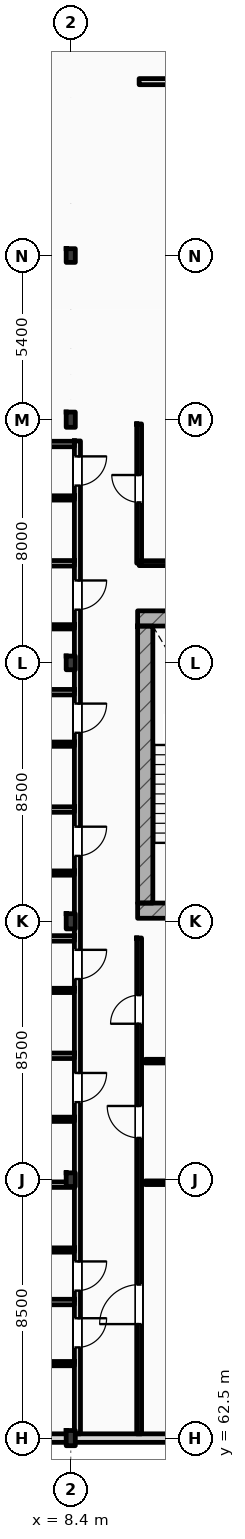
"""IFC4 building model, lengths in metres.
Left out: names, types, materials, properties, quantities, classifications, styles, units other than length and angle.
Written with IfcOpenShell. Run it as: python <this file> out.ifc"""

import sys

from ifc_helpers import new_model, si_unit, direction, frame, frame_2d, origin, origin_2d, place, context, subcontext, project, spatial, rectangle, i_section, extrude, element, fill, save


model = new_model("IFC4")
c1 = context("Model", 3, precision=1e-05, world=origin(), true_north=direction((0.0, 1.0)))
c2 = subcontext(c1, "Body", "Model", "MODEL_VIEW")
j1 = project(units=[si_unit("LENGTHUNIT", "METRE"), si_unit("PLANEANGLEUNIT", "RADIAN")], contexts=[c1])
p1 = place(None, origin())
s1 = spatial("IfcSite", under=j1, at=p1, CompositionType="ELEMENT")
p2 = place(p1, origin())
s2 = spatial("IfcBuilding", under=s1, at=p2, CompositionType="ELEMENT")
p3 = place(p2, frame((0.0, 0.0, 24.6)))
s3 = spatial("IfcBuildingStorey", under=s2, at=p3, CompositionType="ELEMENT", Elevation=24.6)
p4 = place(p3, frame((8.4, 62.5, 0.0), z_axis=(0.0, 0.0, 1.0), x_axis=(1.0, 0.0, 0.0)))
e1 = element("IfcColumn", 1, at=p4, inside=s3, PredefinedType="COLUMN", context=c2, shape_type="SweptSolid", body=[
    extrude(i_section(OverallWidth=0.3, OverallDepth=0.5, WebThickness=0.014, FlangeThickness=0.028, FilletRadius=0.027, at=origin_2d()), origin(), (0.0, 0.0, 1.0), 3.6),
])
p5 = place(p3, frame((8.4, 71.0, 0.0), z_axis=(0.0, 0.0, 1.0), x_axis=(1.0, 0.0, 0.0)))
e2 = element("IfcColumn", 2, at=p5, inside=s3, PredefinedType="COLUMN", context=c2, shape_type="SweptSolid", body=[
    extrude(i_section(OverallWidth=0.3, OverallDepth=0.45, WebThickness=0.014, FlangeThickness=0.026, FilletRadius=0.027, at=origin_2d()), origin(), (0.0, 0.0, 1.0), 3.6),
])
p6 = place(p3, frame((8.4, 79.5, 0.0), z_axis=(0.0, 0.0, 1.0), x_axis=(1.0, 0.0, 0.0)))
e3 = element("IfcColumn", 3, at=p6, inside=s3, PredefinedType="COLUMN", context=c2, shape_type="SweptSolid", body=[
    extrude(i_section(OverallWidth=0.3, OverallDepth=0.5, WebThickness=0.014, FlangeThickness=0.028, FilletRadius=0.027, at=origin_2d()), origin(), (0.0, 0.0, 1.0), 3.6),
])
p7 = place(p3, frame((8.4, 88.0, 0.0), z_axis=(0.0, 0.0, 1.0), x_axis=(1.0, 0.0, 0.0)))
e4 = element("IfcColumn", 4, at=p7, inside=s3, PredefinedType="COLUMN", context=c2, shape_type="SweptSolid", body=[
    extrude(i_section(OverallWidth=0.3, OverallDepth=0.45, WebThickness=0.014, FlangeThickness=0.026, FilletRadius=0.027, at=origin_2d()), origin(), (0.0, 0.0, 1.0), 3.6),
])
p8 = place(p3, frame((8.4, 96.0, 0.0), z_axis=(0.0, 0.0, 1.0), x_axis=(1.0, 0.0, 0.0)))
e5 = element("IfcColumn", 5, at=p8, inside=s3, PredefinedType="COLUMN", context=c2, shape_type="SweptSolid", body=[
    extrude(i_section(OverallWidth=0.3, OverallDepth=0.5, WebThickness=0.014, FlangeThickness=0.028, FilletRadius=0.027, at=origin_2d()), origin(), (0.0, 0.0, 1.0), 3.6),
])
p9 = place(p3, frame((8.4, 101.4, 0.0), z_axis=(0.0, 0.0, 1.0), x_axis=(1.0, 0.0, 0.0)))
e6 = element("IfcColumn", 6, at=p9, inside=s3, PredefinedType="COLUMN", context=c2, shape_type="SweptSolid", body=[
    extrude(i_section(OverallWidth=0.3, OverallDepth=0.45, WebThickness=0.014, FlangeThickness=0.026, FilletRadius=0.027, at=origin_2d()), origin(), (0.0, 0.0, 1.0), 3.6),
])
for number, where, z_axis, x_axis in (
    (7, (10.6, 89.462, 0.0), (0.0, 0.0, 1.0), (1.0, 0.0, 0.0)),
    (8, (10.6, 79.85, 0.0), (0.0, 0.0, 1.0), (1.0, 0.0, 0.0)),
):
    element("IfcWall", number, at=place(p3, frame(where, z_axis=z_axis, x_axis=x_axis)), inside=s3, PredefinedType="SHEAR", context=c2, shape_type="SweptSolid", body=[
        extrude(rectangle(XDim=5.16, YDim=0.5, at=frame_2d((2.58, 0.0))), origin(), (0.0, 0.0, 1.0), 3.6),
    ])
p10 = place(p3, frame((10.85, 80.1, 0.0), z_axis=(0.0, 0.0, 1.0), x_axis=(0.0, 1.0, 0.0)))
e9 = element("IfcWall", 9, at=p10, inside=s3, PredefinedType="SHEAR", context=c2, shape_type="SweptSolid", body=[
    extrude(rectangle(XDim=9.112, YDim=0.5, at=frame_2d((4.556, 0.0))), origin(), (0.0, 0.0, 1.0), 3.6),
])
p11 = place(p3, frame((0.0, 62.5, 0.0), z_axis=(0.0, 0.0, 1.0), x_axis=(1.0, 0.0, 0.0)))
e10 = element("IfcWall", 10, at=p11, inside=s3, PredefinedType="STANDARD", context=c2, shape_type="SweptSolid", body=[
    extrude(rectangle(XDim=25.2, YDim=0.28, at=frame_2d((12.6, 0.0))), origin(), (0.0, 0.0, 1.0), 2.78),
])
p12 = place(p3, frame((10.65, 107.12, 0.0), z_axis=(0.0, 0.0, 1.0), x_axis=(1.0, 0.0, 0.0)))
e11 = element("IfcWall", 11, at=p12, inside=s3, PredefinedType="PARTITIONING", context=c2, shape_type="SweptSolid", body=[
    extrude(rectangle(XDim=14.8, YDim=0.2, at=frame_2d((7.4, 0.0))), origin(), (0.0, 0.0, 1.0), 3.34),
])
p13 = place(p12, frame((8.5, 0.0, 0.0)))
e12 = element("IfcOpeningElement", 12, at=p13, cuts=e11, PredefinedType="OPENING", context=c2, shape_type="SweptSolid", body=[
    extrude(rectangle(XDim=1.25, YDim=2.15, at=frame_2d((0.625, 1.075))), frame((0.0, 0.11, 0.0), z_axis=(0.0, -1.0, 0.0), x_axis=(1.0, 0.0, 0.0)), (0.0, 0.0, 1.0), 0.22),
])
p14 = place(p3, frame((8.62, 62.64, 0.0), z_axis=(0.0, 0.0, 1.0), x_axis=(0.0, 1.0, 0.0)))
e13 = element("IfcWall", 13, at=p14, inside=s3, PredefinedType="PARTITIONING", context=c2, shape_type="SweptSolid", body=[
    extrude(rectangle(XDim=32.66, YDim=0.2, at=frame_2d((16.33, 0.0))), origin(), (0.0, 0.0, 1.0), 2.93),
])
p15 = place(p14, frame((2.843, 0.0, 0.0)))
e14 = element("IfcOpeningElement", 14, at=p15, cuts=e13, PredefinedType="OPENING", context=c2, shape_type="SweptSolid", body=[
    extrude(rectangle(XDim=0.96, YDim=2.2, at=frame_2d((0.48, 1.1))), frame((0.0, 0.11, 0.0), z_axis=(0.0, -1.0, 0.0), x_axis=(1.0, 0.0, 0.0)), (0.0, 0.0, 1.0), 0.22),
])
p16 = place(p14, frame((4.711, 0.0, 0.0)))
e15 = element("IfcOpeningElement", 15, at=p16, cuts=e13, PredefinedType="OPENING", context=c2, shape_type="SweptSolid", body=[
    extrude(rectangle(XDim=0.96, YDim=2.2, at=frame_2d((0.48, 1.1))), frame((0.0, 0.11, 0.0), z_axis=(0.0, -1.0, 0.0), x_axis=(1.0, 0.0, 0.0)), (0.0, 0.0, 1.0), 0.22),
])
p17 = place(p14, frame((10.911, 0.0, 0.0)))
e16 = element("IfcOpeningElement", 16, at=p17, cuts=e13, PredefinedType="OPENING", context=c2, shape_type="SweptSolid", body=[
    extrude(rectangle(XDim=0.96, YDim=2.2, at=frame_2d((0.48, 1.1))), frame((0.0, 0.11, 0.0), z_axis=(0.0, -1.0, 0.0), x_axis=(1.0, 0.0, 0.0)), (0.0, 0.0, 1.0), 0.22),
])
p18 = place(p14, frame((14.961, 0.0, 0.0)))
e17 = element("IfcOpeningElement", 17, at=p18, cuts=e13, PredefinedType="OPENING", context=c2, shape_type="SweptSolid", body=[
    extrude(rectangle(XDim=0.96, YDim=2.2, at=frame_2d((0.48, 1.1))), frame((0.0, 0.11, 0.0), z_axis=(0.0, -1.0, 0.0), x_axis=(1.0, 0.0, 0.0)), (0.0, 0.0, 1.0), 0.22),
])
p19 = place(p14, frame((19.012, 0.0, 0.0)))
e18 = element("IfcOpeningElement", 18, at=p19, cuts=e13, PredefinedType="OPENING", context=c2, shape_type="SweptSolid", body=[
    extrude(rectangle(XDim=0.96, YDim=2.2, at=frame_2d((0.48, 1.1))), frame((0.0, 0.11, 0.0), z_axis=(0.0, -1.0, 0.0), x_axis=(1.0, 0.0, 0.0)), (0.0, 0.0, 1.0), 0.22),
])
p20 = place(p14, frame((23.061, 0.0, 0.0)))
e19 = element("IfcOpeningElement", 19, at=p20, cuts=e13, PredefinedType="OPENING", context=c2, shape_type="SweptSolid", body=[
    extrude(rectangle(XDim=0.96, YDim=2.2, at=frame_2d((0.48, 1.1))), frame((0.0, 0.11, 0.0), z_axis=(0.0, -1.0, 0.0), x_axis=(1.0, 0.0, 0.0)), (0.0, 0.0, 1.0), 0.22),
])
p21 = place(p14, frame((27.111, 0.0, 0.0)))
e20 = element("IfcOpeningElement", 20, at=p21, cuts=e13, PredefinedType="OPENING", context=c2, shape_type="SweptSolid", body=[
    extrude(rectangle(XDim=0.96, YDim=2.2, at=frame_2d((0.48, 1.1))), frame((0.0, 0.11, 0.0), z_axis=(0.0, -1.0, 0.0), x_axis=(1.0, 0.0, 0.0)), (0.0, 0.0, 1.0), 0.22),
])
p22 = place(p14, frame((31.193, 0.0, 0.0)))
e21 = element("IfcOpeningElement", 21, at=p22, cuts=e13, PredefinedType="OPENING", context=c2, shape_type="SweptSolid", body=[
    extrude(rectangle(XDim=0.96, YDim=2.2, at=frame_2d((0.48, 1.1))), frame((0.0, 0.11, 0.0), z_axis=(0.0, -1.0, 0.0), x_axis=(1.0, 0.0, 0.0)), (0.0, 0.0, 1.0), 0.22),
])
p23 = place(p3, frame((10.65, 62.64, 0.0), z_axis=(0.0, 0.0, 1.0), x_axis=(0.0, 1.0, 0.0)))
e22 = element("IfcWall", 22, at=p23, inside=s3, PredefinedType="PARTITIONING", context=c2, shape_type="SweptSolid", body=[
    extrude(rectangle(XDim=16.31, YDim=0.16, at=frame_2d((8.155, 0.0))), origin(), (0.0, 0.0, 1.0), 3.34),
])
p24 = place(p23, frame((3.61, 0.0, 0.0)))
e23 = element("IfcOpeningElement", 23, at=p24, cuts=e22, PredefinedType="OPENING", context=c2, shape_type="SweptSolid", body=[
    extrude(rectangle(XDim=1.3, YDim=2.2, at=frame_2d((0.65, 1.1))), frame((0.0, 0.09, 0.0), z_axis=(0.0, -1.0, 0.0), x_axis=(1.0, 0.0, 0.0)), (0.0, 0.0, 1.0), 0.18),
])
p25 = place(p23, frame((9.735, 0.0, 0.0)))
e24 = element("IfcOpeningElement", 24, at=p25, cuts=e22, PredefinedType="OPENING", context=c2, shape_type="SweptSolid", body=[
    extrude(rectangle(XDim=1.05, YDim=2.12, at=frame_2d((0.525, 1.06))), frame((0.0, 0.09, 0.0), z_axis=(0.0, -1.0, 0.0), x_axis=(1.0, 0.0, 0.0)), (0.0, 0.0, 1.0), 0.18),
])
p26 = place(p23, frame((13.49, 0.0, 0.0)))
e25 = element("IfcOpeningElement", 25, at=p26, cuts=e22, PredefinedType="OPENING", context=c2, shape_type="SweptSolid", body=[
    extrude(rectangle(XDim=0.94, YDim=2.15, at=frame_2d((0.47, 1.075))), frame((0.0, 0.09, 0.0), z_axis=(0.0, -1.0, 0.0), x_axis=(1.0, 0.0, 0.0)), (0.0, 0.0, 1.0), 0.18),
])
p27 = place(p3, frame((10.65, 91.28, 0.0), z_axis=(0.0, 0.0, 1.0), x_axis=(0.0, 1.0, 0.0)))
e26 = element("IfcWall", 26, at=p27, inside=s3, PredefinedType="PARTITIONING", context=c2, shape_type="SweptSolid", body=[
    extrude(rectangle(XDim=4.58, YDim=0.16, at=frame_2d((2.29, 0.0))), origin(), (0.0, 0.0, 1.0), 3.34),
])
p28 = place(p27, frame((2.0, 0.0, 0.0)))
e27 = element("IfcOpeningElement", 27, at=p28, cuts=e26, PredefinedType="OPENING", context=c2, shape_type="SweptSolid", body=[
    extrude(rectangle(XDim=0.9, YDim=2.1, at=frame_2d((0.45, 1.05))), frame((0.0, 0.09, 0.0), z_axis=(0.0, -1.0, 0.0), x_axis=(1.0, 0.0, 0.0)), (0.0, 0.0, 1.0), 0.18),
])
p29 = place(p3, frame((10.65, 91.28, 0.0), z_axis=(0.0, 0.0, 1.0), x_axis=(1.0, 0.0, 0.0)))
e28 = element("IfcWall", 28, at=p29, inside=s3, PredefinedType="PARTITIONING", context=c2, shape_type="SweptSolid", body=[
    extrude(rectangle(XDim=6.9, YDim=0.16, at=frame_2d((3.45, 0.0))), origin(), (0.0, 0.0, 1.0), 3.34),
])
p30 = place(p3, frame((0.15, 66.976, 0.0), z_axis=(0.0, 0.0, 1.0), x_axis=(1.0, 0.0, 0.0)))
e29 = element("IfcWall", 29, at=p30, inside=s3, PredefinedType="PARTITIONING", context=c2, shape_type="SweptSolid", body=[
    extrude(rectangle(XDim=8.37, YDim=0.18, at=frame_2d((4.185, 0.0))), origin(), (0.0, 0.0, 1.0), 3.34),
])
p31 = place(p3, frame((5.05, 64.95, 0.0), z_axis=(0.0, 0.0, 1.0), x_axis=(1.0, 0.0, 0.0)))
e30 = element("IfcWall", 30, at=p31, inside=s3, PredefinedType="PARTITIONING", context=c2, shape_type="SweptSolid", body=[
    extrude(rectangle(XDim=3.47, YDim=0.14, at=frame_2d((1.735, 0.0))), origin(), (0.0, 0.0, 1.0), 3.34),
])
p32 = place(p3, frame((0.15, 70.837, 0.0), z_axis=(0.0, 0.0, 1.0), x_axis=(1.0, 0.0, 0.0)))
e31 = element("IfcWall", 31, at=p32, inside=s3, PredefinedType="PARTITIONING", context=c2, shape_type="SweptSolid", body=[
    extrude(rectangle(XDim=8.37, YDim=0.18, at=frame_2d((4.185, 0.0))), origin(), (0.0, 0.0, 1.0), 2.78),
])
p33 = place(p3, frame((5.05, 68.687, 0.0), z_axis=(0.0, 0.0, 1.0), x_axis=(1.0, 0.0, 0.0)))
e32 = element("IfcWall", 32, at=p33, inside=s3, PredefinedType="PARTITIONING", context=c2, shape_type="SweptSolid", body=[
    extrude(rectangle(XDim=3.47, YDim=0.14, at=frame_2d((1.735, 0.0))), origin(), (0.0, 0.0, 1.0), 3.34),
])
p34 = place(p3, frame((0.15, 75.076, 0.0), z_axis=(0.0, 0.0, 1.0), x_axis=(1.0, 0.0, 0.0)))
e33 = element("IfcWall", 33, at=p34, inside=s3, PredefinedType="PARTITIONING", context=c2, shape_type="SweptSolid", body=[
    extrude(rectangle(XDim=8.37, YDim=0.18, at=frame_2d((4.185, 0.0))), origin(), (0.0, 0.0, 1.0), 3.34),
])
p35 = place(p3, frame((5.05, 72.987, 0.0), z_axis=(0.0, 0.0, 1.0), x_axis=(1.0, 0.0, 0.0)))
e34 = element("IfcWall", 34, at=p35, inside=s3, PredefinedType="PARTITIONING", context=c2, shape_type="SweptSolid", body=[
    extrude(rectangle(XDim=3.47, YDim=0.14, at=frame_2d((1.735, 0.0))), origin(), (0.0, 0.0, 1.0), 3.34),
])
p36 = place(p3, frame((0.15, 78.937, 0.0), z_axis=(0.0, 0.0, 1.0), x_axis=(1.0, 0.0, 0.0)))
e35 = element("IfcWall", 35, at=p36, inside=s3, PredefinedType="PARTITIONING", context=c2, shape_type="SweptSolid", body=[
    extrude(rectangle(XDim=8.37, YDim=0.18, at=frame_2d((4.185, 0.0))), origin(), (0.0, 0.0, 1.0), 3.34),
])
p37 = place(p3, frame((5.05, 77.226, 0.0), z_axis=(0.0, 0.0, 1.0), x_axis=(1.0, 0.0, 0.0)))
e36 = element("IfcWall", 36, at=p37, inside=s3, PredefinedType="PARTITIONING", context=c2, shape_type="SweptSolid", body=[
    extrude(rectangle(XDim=3.47, YDim=0.14, at=frame_2d((1.735, 0.0))), origin(), (0.0, 0.0, 1.0), 3.34),
])
p38 = place(p3, frame((0.15, 83.176, 0.0), z_axis=(0.0, 0.0, 1.0), x_axis=(1.0, 0.0, 0.0)))
e37 = element("IfcWall", 37, at=p38, inside=s3, PredefinedType="PARTITIONING", context=c2, shape_type="SweptSolid", body=[
    extrude(rectangle(XDim=8.37, YDim=0.18, at=frame_2d((4.185, 0.0))), origin(), (0.0, 0.0, 1.0), 3.34),
])
p39 = place(p3, frame((5.05, 81.087, 0.0), z_axis=(0.0, 0.0, 1.0), x_axis=(1.0, 0.0, 0.0)))
e38 = element("IfcWall", 38, at=p39, inside=s3, PredefinedType="PARTITIONING", context=c2, shape_type="SweptSolid", body=[
    extrude(rectangle(XDim=3.47, YDim=0.14, at=frame_2d((1.735, 0.0))), origin(), (0.0, 0.0, 1.0), 3.34),
])
p40 = place(p3, frame((0.15, 87.037, 0.0), z_axis=(0.0, 0.0, 1.0), x_axis=(1.0, 0.0, 0.0)))
e39 = element("IfcWall", 39, at=p40, inside=s3, PredefinedType="PARTITIONING", context=c2, shape_type="SweptSolid", body=[
    extrude(rectangle(XDim=8.37, YDim=0.18, at=frame_2d((4.185, 0.0))), origin(), (0.0, 0.0, 1.0), 3.34),
])
p41 = place(p3, frame((5.05, 85.326, 0.0), z_axis=(0.0, 0.0, 1.0), x_axis=(1.0, 0.0, 0.0)))
e40 = element("IfcWall", 40, at=p41, inside=s3, PredefinedType="PARTITIONING", context=c2, shape_type="SweptSolid", body=[
    extrude(rectangle(XDim=3.47, YDim=0.14, at=frame_2d((1.735, 0.0))), origin(), (0.0, 0.0, 1.0), 3.34),
])
p42 = place(p3, frame((0.15, 91.276, 0.0), z_axis=(0.0, 0.0, 1.0), x_axis=(1.0, 0.0, 0.0)))
e41 = element("IfcWall", 41, at=p42, inside=s3, PredefinedType="PARTITIONING", context=c2, shape_type="SweptSolid", body=[
    extrude(rectangle(XDim=8.37, YDim=0.18, at=frame_2d((4.185, 0.0))), origin(), (0.0, 0.0, 1.0), 3.34),
])
p43 = place(p3, frame((5.05, 89.187, 0.0), z_axis=(0.0, 0.0, 1.0), x_axis=(1.0, 0.0, 0.0)))
e42 = element("IfcWall", 42, at=p43, inside=s3, PredefinedType="PARTITIONING", context=c2, shape_type="SweptSolid", body=[
    extrude(rectangle(XDim=3.47, YDim=0.14, at=frame_2d((1.735, 0.0))), origin(), (0.0, 0.0, 1.0), 3.34),
])
p44 = place(p3, frame((0.15, 95.2, 0.0), z_axis=(0.0, 0.0, 1.0), x_axis=(1.0, 0.0, 0.0)))
e43 = element("IfcWall", 43, at=p44, inside=s3, PredefinedType="PARTITIONING", context=c2, shape_type="SweptSolid", body=[
    extrude(rectangle(XDim=8.37, YDim=0.18, at=frame_2d((4.185, 0.0))), origin(), (0.0, 0.0, 1.0), 3.34),
])
p45 = place(p3, frame((5.05, 93.426, 0.0), z_axis=(0.0, 0.0, 1.0), x_axis=(1.0, 0.0, 0.0)))
e44 = element("IfcWall", 44, at=p45, inside=s3, PredefinedType="PARTITIONING", context=c2, shape_type="SweptSolid", body=[
    extrude(rectangle(XDim=3.47, YDim=0.14, at=frame_2d((1.735, 0.0))), origin(), (0.0, 0.0, 1.0), 3.34),
])
p46 = place(p3, frame((10.85, 70.9, 0.0), z_axis=(0.0, 0.0, 1.0), x_axis=(1.0, 0.0, 0.0)))
e45 = element("IfcWall", 45, at=p46, inside=s3, PredefinedType="PARTITIONING", context=c2, shape_type="SweptSolid", body=[
    extrude(rectangle(XDim=7.35, YDim=0.12, at=frame_2d((3.675, 0.0))), origin(), (0.0, 0.0, 1.0), 2.78),
])
p47 = place(p3, frame((10.85, 74.9, 0.0), z_axis=(0.0, 0.0, 1.0), x_axis=(1.0, 0.0, 0.0)))
e46 = element("IfcWall", 46, at=p47, inside=s3, PredefinedType="PARTITIONING", context=c2, shape_type="SweptSolid", body=[
    extrude(rectangle(XDim=5.35, YDim=0.12, at=frame_2d((2.675, 0.0))), origin(), (0.0, 0.0, 1.0), 3.34),
])
p48 = place(p15, frame((0.96, 0.0, 0.0), z_axis=(0.0, 0.0, 1.0), x_axis=(-1.0, 0.0, 0.0)))
e47 = element("IfcDoor", 47, at=p48, inside=s3, OperationType="SINGLE_SWING_RIGHT", PredefinedType="DOOR", context=c2, shape_type="SweptSolid", body=[
    extrude(rectangle(XDim=0.96, YDim=2.2, at=frame_2d((0.48, 1.1))), frame((0.0, 0.025, 0.0), z_axis=(0.0, -1.0, 0.0), x_axis=(1.0, 0.0, 0.0)), (0.0, 0.0, 1.0), 0.05),
])
fill(e14, e47)
p49 = place(p16, frame((0.96, 0.0, 0.0), z_axis=(0.0, 0.0, 1.0), x_axis=(-1.0, 0.0, 0.0)))
e48 = element("IfcDoor", 48, at=p49, inside=s3, OperationType="SINGLE_SWING_RIGHT", PredefinedType="DOOR", context=c2, shape_type="SweptSolid", body=[
    extrude(rectangle(XDim=0.96, YDim=2.2, at=frame_2d((0.48, 1.1))), frame((0.0, 0.025, 0.0), z_axis=(0.0, -1.0, 0.0), x_axis=(1.0, 0.0, 0.0)), (0.0, 0.0, 1.0), 0.05),
])
fill(e15, e48)
p50 = place(p17, frame((0.96, 0.0, 0.0), z_axis=(0.0, 0.0, 1.0), x_axis=(-1.0, 0.0, 0.0)))
e49 = element("IfcDoor", 49, at=p50, inside=s3, OperationType="SINGLE_SWING_RIGHT", PredefinedType="DOOR", context=c2, shape_type="SweptSolid", body=[
    extrude(rectangle(XDim=0.96, YDim=2.2, at=frame_2d((0.48, 1.1))), frame((0.0, 0.025, 0.0), z_axis=(0.0, -1.0, 0.0), x_axis=(1.0, 0.0, 0.0)), (0.0, 0.0, 1.0), 0.05),
])
fill(e16, e49)
p51 = place(p18, frame((0.96, 0.0, 0.0), z_axis=(0.0, 0.0, 1.0), x_axis=(-1.0, 0.0, 0.0)))
e50 = element("IfcDoor", 50, at=p51, inside=s3, OperationType="SINGLE_SWING_RIGHT", PredefinedType="DOOR", context=c2, shape_type="SweptSolid", body=[
    extrude(rectangle(XDim=0.96, YDim=2.2, at=frame_2d((0.48, 1.1))), frame((0.0, 0.025, 0.0), z_axis=(0.0, -1.0, 0.0), x_axis=(1.0, 0.0, 0.0)), (0.0, 0.0, 1.0), 0.05),
])
fill(e17, e50)
p52 = place(p19, frame((0.96, 0.0, 0.0), z_axis=(0.0, 0.0, 1.0), x_axis=(-1.0, 0.0, 0.0)))
e51 = element("IfcDoor", 51, at=p52, inside=s3, OperationType="SINGLE_SWING_RIGHT", PredefinedType="DOOR", context=c2, shape_type="SweptSolid", body=[
    extrude(rectangle(XDim=0.96, YDim=2.2, at=frame_2d((0.48, 1.1))), frame((0.0, 0.025, 0.0), z_axis=(0.0, -1.0, 0.0), x_axis=(1.0, 0.0, 0.0)), (0.0, 0.0, 1.0), 0.05),
])
fill(e18, e51)
p53 = place(p20, frame((0.96, 0.0, 0.0), z_axis=(0.0, 0.0, 1.0), x_axis=(-1.0, 0.0, 0.0)))
e52 = element("IfcDoor", 52, at=p53, inside=s3, OperationType="SINGLE_SWING_RIGHT", PredefinedType="DOOR", context=c2, shape_type="SweptSolid", body=[
    extrude(rectangle(XDim=0.96, YDim=2.2, at=frame_2d((0.48, 1.1))), frame((0.0, 0.025, 0.0), z_axis=(0.0, -1.0, 0.0), x_axis=(1.0, 0.0, 0.0)), (0.0, 0.0, 1.0), 0.05),
])
fill(e19, e52)
p54 = place(p21, frame((0.96, 0.0, 0.0), z_axis=(0.0, 0.0, 1.0), x_axis=(-1.0, 0.0, 0.0)))
e53 = element("IfcDoor", 53, at=p54, inside=s3, OperationType="SINGLE_SWING_RIGHT", PredefinedType="DOOR", context=c2, shape_type="SweptSolid", body=[
    extrude(rectangle(XDim=0.96, YDim=2.2, at=frame_2d((0.48, 1.1))), frame((0.0, 0.025, 0.0), z_axis=(0.0, -1.0, 0.0), x_axis=(1.0, 0.0, 0.0)), (0.0, 0.0, 1.0), 0.05),
])
fill(e20, e53)
p55 = place(p22, frame((0.96, 0.0, 0.0), z_axis=(0.0, 0.0, 1.0), x_axis=(-1.0, 0.0, 0.0)))
e54 = element("IfcDoor", 54, at=p55, inside=s3, OperationType="SINGLE_SWING_RIGHT", PredefinedType="DOOR", context=c2, shape_type="SweptSolid", body=[
    extrude(rectangle(XDim=0.96, YDim=2.2, at=frame_2d((0.48, 1.1))), frame((0.0, 0.025, 0.0), z_axis=(0.0, -1.0, 0.0), x_axis=(1.0, 0.0, 0.0)), (0.0, 0.0, 1.0), 0.05),
])
fill(e21, e54)
p56 = place(p24, origin())
e55 = element("IfcDoor", 55, at=p56, inside=s3, OperationType="SINGLE_SWING_LEFT", PredefinedType="DOOR", context=c2, shape_type="SweptSolid", body=[
    extrude(rectangle(XDim=1.3, YDim=2.2, at=frame_2d((0.65, 1.1))), frame((0.0, 0.025, 0.0), z_axis=(0.0, -1.0, 0.0), x_axis=(1.0, 0.0, 0.0)), (0.0, 0.0, 1.0), 0.05),
])
fill(e23, e55)
p57 = place(p25, origin())
e56 = element("IfcDoor", 56, at=p57, inside=s3, OperationType="SINGLE_SWING_RIGHT", PredefinedType="DOOR", context=c2, shape_type="SweptSolid", body=[
    extrude(rectangle(XDim=1.05, YDim=2.12, at=frame_2d((0.525, 1.06))), frame((0.0, 0.025, 0.0), z_axis=(0.0, -1.0, 0.0), x_axis=(1.0, 0.0, 0.0)), (0.0, 0.0, 1.0), 0.05),
])
fill(e24, e56)
p58 = place(p26, origin())
e57 = element("IfcDoor", 57, at=p58, inside=s3, OperationType="SINGLE_SWING_LEFT", PredefinedType="DOOR", context=c2, shape_type="SweptSolid", body=[
    extrude(rectangle(XDim=0.94, YDim=2.15, at=frame_2d((0.47, 1.075))), frame((0.0, 0.025, 0.0), z_axis=(0.0, -1.0, 0.0), x_axis=(1.0, 0.0, 0.0)), (0.0, 0.0, 1.0), 0.05),
])
fill(e25, e57)
p59 = place(p28, origin())
e58 = element("IfcDoor", 58, at=p59, inside=s3, OperationType="SINGLE_SWING_RIGHT", PredefinedType="DOOR", context=c2, shape_type="SweptSolid", body=[
    extrude(rectangle(XDim=0.9, YDim=2.1, at=frame_2d((0.45, 1.05))), frame((0.0, 0.025, 0.0), z_axis=(0.0, -1.0, 0.0), x_axis=(1.0, 0.0, 0.0)), (0.0, 0.0, 1.0), 0.05),
])
fill(e27, e58)
save(model, sys.argv[1])
